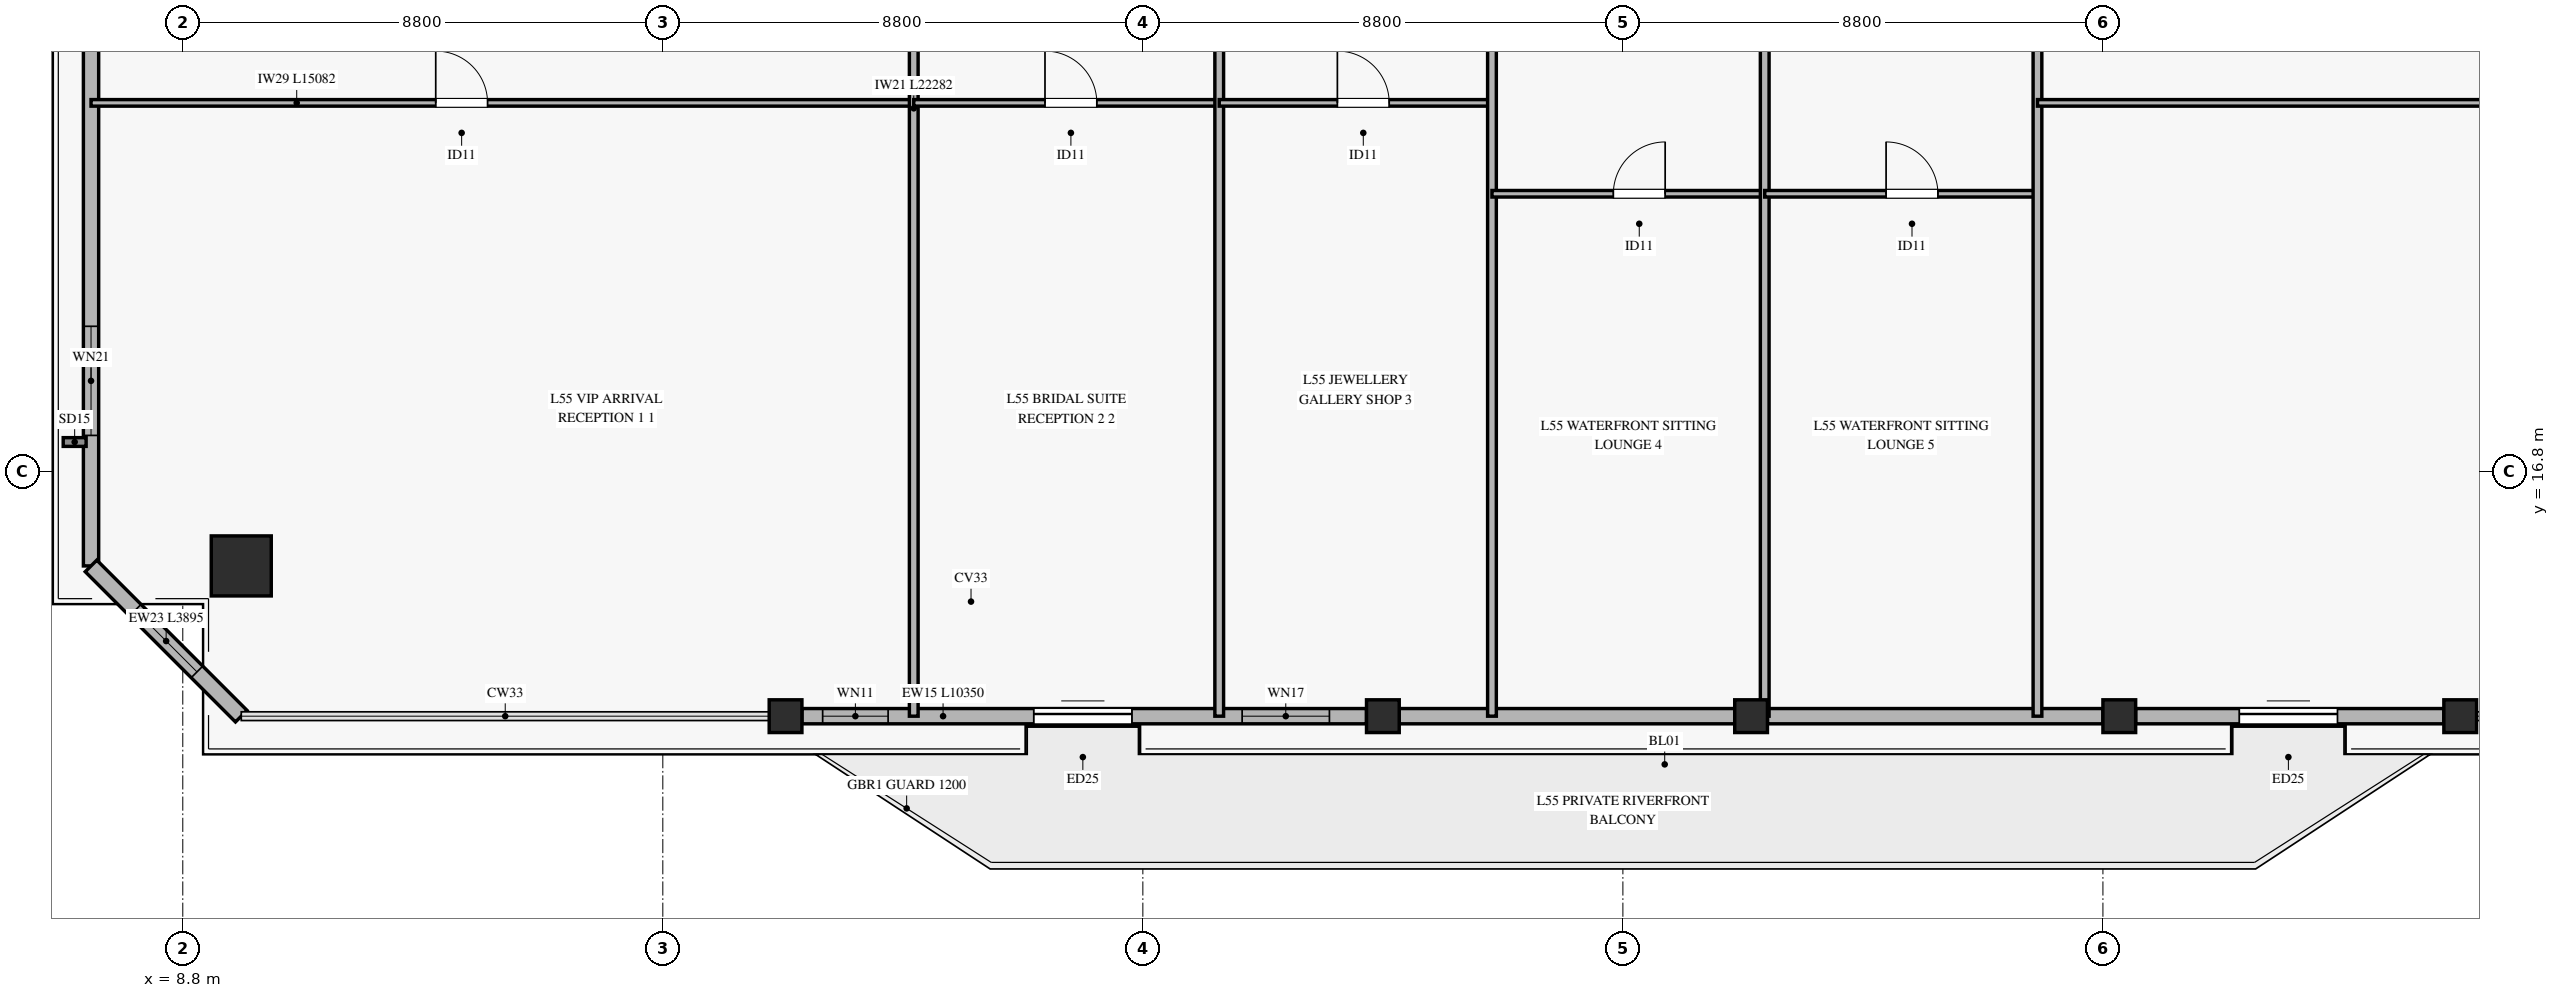
"""IFC4 building model, lengths in metres.
Left out: names, types, materials, properties, quantities, classifications, styles, units other than length and angle.
Written with IfcOpenShell. Run it as: python <this file> out.ifc"""

import sys

from ifc_helpers import new_model, si_unit, direction, frame, frame_2d, origin, origin_2d, place, context, subcontext, project, spatial, rectangle, hollow_rectangle, extrude, source, transform, mapped, element, fill, save


model = new_model("IFC4")
c1 = context("Model", 3, precision=1e-05, world=origin(), true_north=direction((0.0, 1.0)))
c2 = subcontext(c1, "Body", "Model", "MODEL_VIEW")
j1 = project(units=[si_unit("LENGTHUNIT", "METRE"), si_unit("PLANEANGLEUNIT", "RADIAN")], contexts=[c1])
p1 = place(None, origin())
s1 = spatial("IfcSite", under=j1, at=p1, CompositionType="ELEMENT")
p2 = place(p1, origin())
s2 = spatial("IfcBuilding", under=s1, at=p2, CompositionType="ELEMENT")
p3 = place(p2, frame((0.0, 0.0, 216.7)))
s3 = spatial("IfcBuildingStorey", under=s2, at=p3, CompositionType="ELEMENT", Elevation=216.7)
m1 = source(origin(), c2, "Body", "SweptSolid", [
    extrude(hollow_rectangle(XDim=1.1, YDim=1.1, WallThickness=0.05, at=origin_2d()), origin(), (0.0, 0.0, 1.0), 3.24),
])
p4 = place(p3, frame((9.872, 15.072, 0.0), z_axis=(0.0, 0.0, 1.0), x_axis=(1.0, 0.0, 0.0)))
e1 = element("IfcColumn", 1, at=p4, inside=s3, PredefinedType="COLUMN", context=c2, shape_type="MappedRepresentation", body=[
    mapped(m1, transform((0.0, 0.0, 0.0), x_axis=(1.0, 0.0, 0.0), y_axis=(0.0, 1.0, 0.0), z_axis=(0.0, 0.0, 1.0), scale=1.0)),
])
m2 = source(origin(), c2, "Body", "SweptSolid", [
    extrude(hollow_rectangle(XDim=0.6, YDim=0.6, WallThickness=0.028, at=origin_2d()), origin(), (0.0, 0.0, 1.0), 3.24),
])
for number, where, z_axis, x_axis in (
    (2, (19.85, 12.318, 0.0), (0.0, 0.0, 1.0), (1.0, 0.0, 0.0)),
    (3, (30.8, 12.318, 0.0), (0.0, 0.0, 1.0), (1.0, 0.0, 0.0)),
    (4, (37.55, 12.318, 0.0), (0.0, 0.0, 1.0), (1.0, 0.0, 0.0)),
    (5, (44.3, 12.318, 0.0), (0.0, 0.0, 1.0), (1.0, 0.0, 0.0)),
    (6, (50.55, 12.318, 0.0), (0.0, 0.0, 1.0), (1.0, 0.0, 0.0)),
):
    element("IfcColumn", number, at=place(p3, frame(where, z_axis=z_axis, x_axis=x_axis)), inside=s3, PredefinedType="COLUMN", context=c2, shape_type="MappedRepresentation", body=[
        mapped(m2, transform((0.0, 0.0, 0.0), x_axis=(1.0, 0.0, 0.0), y_axis=(0.0, 1.0, 0.0), z_axis=(0.0, 0.0, 1.0), scale=1.0)),
    ])
p5 = place(p3, frame((20.15, 12.318, 0.0), z_axis=(0.0, 0.0, 1.0), x_axis=(1.0, 0.0, 0.0)))
e7 = element("IfcWall", 7, at=p5, inside=s3, PredefinedType="SOLIDWALL", context=c2, shape_type="SweptSolid", body=[
    extrude(rectangle(XDim=10.35, YDim=0.28, at=frame_2d((5.175, 0.0))), origin(), (0.0, 0.0, 1.0), 2.72),
])
p6 = place(p5, frame((4.25, 0.0, 0.0)))
e8 = element("IfcOpeningElement", 8, at=p6, cuts=e7, PredefinedType="OPENING", context=c2, shape_type="SweptSolid", body=[
    extrude(rectangle(XDim=1.8, YDim=2.25, at=frame_2d((0.9, 1.125))), frame((0.0, 0.15, 0.0), z_axis=(0.0, -1.0, 0.0), x_axis=(1.0, 0.0, 0.0)), (0.0, 0.0, 1.0), 0.3),
])
p7 = place(p5, frame((0.38, 0.0, 0.35)))
e9 = element("IfcOpeningElement", 9, at=p7, cuts=e7, PredefinedType="OPENING", context=c2, shape_type="SweptSolid", body=[
    extrude(rectangle(XDim=1.2, YDim=2.0, at=frame_2d((0.6, 1.0))), frame((0.0, 0.15, 0.0), z_axis=(0.0, -1.0, 0.0), x_axis=(1.0, 0.0, 0.0)), (0.0, 0.0, 1.0), 0.3),
])
p8 = place(p5, frame((8.07, 0.0, 0.35)))
e10 = element("IfcOpeningElement", 10, at=p8, cuts=e7, PredefinedType="OPENING", context=c2, shape_type="SweptSolid", body=[
    extrude(rectangle(XDim=1.6, YDim=2.0, at=frame_2d((0.8, 1.0))), frame((0.0, 0.15, 0.0), z_axis=(0.0, -1.0, 0.0), x_axis=(1.0, 0.0, 0.0)), (0.0, 0.0, 1.0), 0.3),
])
for number, where, z_axis, x_axis in (
    (11, (31.1, 12.318, 0.0), (0.0, 0.0, 1.0), (1.0, 0.0, 0.0)),
    (12, (37.85, 12.318, 0.0), (0.0, 0.0, 1.0), (1.0, 0.0, 0.0)),
):
    element("IfcWall", number, at=place(p3, frame(where, z_axis=z_axis, x_axis=x_axis)), inside=s3, PredefinedType="SOLIDWALL", context=c2, shape_type="SweptSolid", body=[
        extrude(rectangle(XDim=6.15, YDim=0.28, at=frame_2d((3.075, 0.0))), origin(), (0.0, 0.0, 1.0), 2.72),
    ])
p9 = place(p3, frame((44.6, 12.318, 0.0), z_axis=(0.0, 0.0, 1.0), x_axis=(1.0, 0.0, 0.0)))
e13 = element("IfcWall", 13, at=p9, inside=s3, PredefinedType="SOLIDWALL", context=c2, shape_type="SweptSolid", body=[
    extrude(rectangle(XDim=5.65, YDim=0.28, at=frame_2d((2.825, 0.0))), origin(), (0.0, 0.0, 1.0), 2.72),
])
p10 = place(p9, frame((1.9, 0.0, 0.0)))
e14 = element("IfcOpeningElement", 14, at=p10, cuts=e13, PredefinedType="OPENING", context=c2, shape_type="SweptSolid", body=[
    extrude(rectangle(XDim=1.8, YDim=2.25, at=frame_2d((0.9, 1.125))), frame((0.0, 0.15, 0.0), z_axis=(0.0, -1.0, 0.0), x_axis=(1.0, 0.0, 0.0)), (0.0, 0.0, 1.0), 0.3),
])
p11 = place(p3, frame((7.118, 15.072, 0.0), z_axis=(0.0, 0.0, 1.0), x_axis=(0.0, 1.0, 0.0)))
e15 = element("IfcWall", 15, at=p11, inside=s3, PredefinedType="SOLIDWALL", context=c2, shape_type="SweptSolid", body=[
    extrude(rectangle(XDim=13.837, YDim=0.28, at=frame_2d((6.918, 0.0))), origin(), (0.0, 0.0, 1.0), 2.72),
])
p12 = place(p11, frame((2.392, 0.0, 0.45)))
e16 = element("IfcOpeningElement", 16, at=p12, cuts=e15, PredefinedType="OPENING", context=c2, shape_type="SweptSolid", body=[
    extrude(rectangle(XDim=2.0, YDim=2.0, at=frame_2d((1.0, 1.0))), frame((0.0, 0.15, 0.0), z_axis=(0.0, -1.0, 0.0), x_axis=(1.0, 0.0, 0.0)), (0.0, 0.0, 1.0), 0.3),
])
p13 = place(p3, frame((7.118, 15.072, 0.0), z_axis=(0.0, 0.0, 1.0), x_axis=(0.707138122488, -0.707075438496, 0.0)))
e17 = element("IfcWall", 17, at=p13, inside=s3, PredefinedType="SOLIDWALL", context=c2, shape_type="SweptSolid", body=[
    extrude(rectangle(XDim=3.895, YDim=0.3, at=frame_2d((1.947, 0.0))), origin(), (0.0, 0.0, 1.0), 2.72),
])
p14 = place(p13, frame((1.147, 0.0, 0.45)))
e18 = element("IfcOpeningElement", 18, at=p14, cuts=e17, PredefinedType="OPENING", context=c2, shape_type="SweptSolid", body=[
    extrude(rectangle(XDim=1.6, YDim=2.0, at=frame_2d((0.8, 1.0))), frame((0.0, 0.16, 0.0), z_axis=(0.0, -1.0, 0.0), x_axis=(1.0, 0.0, 0.0)), (0.0, 0.0, 1.0), 0.32),
])
p15 = place(p3, frame((7.118, 23.559, 0.0), z_axis=(0.0, 0.0, 1.0), x_axis=(1.0, 0.0, 0.0)))
e19 = element("IfcWall", 19, at=p15, inside=s3, PredefinedType="PARTITIONING", context=c2, shape_type="SweptSolid", body=[
    extrude(rectangle(XDim=15.082, YDim=0.12, at=frame_2d((7.541, 0.0))), origin(), (0.0, 0.0, 1.0), 2.425),
])
p16 = place(p15, frame((6.319, 0.0, 0.0)))
e20 = element("IfcOpeningElement", 20, at=p16, cuts=e19, PredefinedType="OPENING", context=c2, shape_type="SweptSolid", body=[
    extrude(rectangle(XDim=0.95, YDim=2.1, at=frame_2d((0.475, 1.05))), frame((0.0, 0.07, 0.0), z_axis=(0.0, -1.0, 0.0), x_axis=(1.0, 0.0, 0.0)), (0.0, 0.0, 1.0), 0.14),
])
p17 = place(p3, frame((22.2, 12.318, 0.0), z_axis=(0.0, 0.0, 1.0), x_axis=(0.0, 1.0, 0.0)))
e21 = element("IfcWall", 21, at=p17, inside=s3, PredefinedType="PARTITIONING", context=c2, shape_type="SweptSolid", body=[
    extrude(rectangle(XDim=22.282, YDim=0.16, at=frame_2d((11.141, 0.0))), origin(), (0.0, 0.0, 1.0), 2.725),
])
p18 = place(p3, frame((22.2, 23.559, 0.0), z_axis=(0.0, 0.0, 1.0), x_axis=(1.0, 0.0, 0.0)))
e22 = element("IfcWall", 22, at=p18, inside=s3, PredefinedType="PARTITIONING", context=c2, shape_type="SweptSolid", body=[
    extrude(rectangle(XDim=5.6, YDim=0.12, at=frame_2d((2.8, 0.0))), origin(), (0.0, 0.0, 1.0), 3.24),
])
p19 = place(p18, frame((2.406, 0.0, 0.0)))
e23 = element("IfcOpeningElement", 23, at=p19, cuts=e22, PredefinedType="OPENING", context=c2, shape_type="SweptSolid", body=[
    extrude(rectangle(XDim=0.95, YDim=2.1, at=frame_2d((0.475, 1.05))), frame((0.0, 0.07, 0.0), z_axis=(0.0, -1.0, 0.0), x_axis=(1.0, 0.0, 0.0)), (0.0, 0.0, 1.0), 0.14),
])
p20 = place(p3, frame((27.8, 12.318, 0.0), z_axis=(0.0, 0.0, 1.0), x_axis=(0.0, 1.0, 0.0)))
e24 = element("IfcWall", 24, at=p20, inside=s3, PredefinedType="PARTITIONING", context=c2, shape_type="SweptSolid", body=[
    extrude(rectangle(XDim=22.282, YDim=0.16, at=frame_2d((11.141, 0.0))), origin(), (0.0, 0.0, 1.0), 2.725),
])
p21 = place(p3, frame((27.8, 23.559, 0.0), z_axis=(0.0, 0.0, 1.0), x_axis=(1.0, 0.0, 0.0)))
e25 = element("IfcWall", 25, at=p21, inside=s3, PredefinedType="PARTITIONING", context=c2, shape_type="SweptSolid", body=[
    extrude(rectangle(XDim=5.0, YDim=0.12, at=frame_2d((2.5, 0.0))), origin(), (0.0, 0.0, 1.0), 2.425),
])
p22 = place(p21, frame((2.166, 0.0, 0.0)))
e26 = element("IfcOpeningElement", 26, at=p22, cuts=e25, PredefinedType="OPENING", context=c2, shape_type="SweptSolid", body=[
    extrude(rectangle(XDim=0.95, YDim=2.1, at=frame_2d((0.475, 1.05))), frame((0.0, 0.07, 0.0), z_axis=(0.0, -1.0, 0.0), x_axis=(1.0, 0.0, 0.0)), (0.0, 0.0, 1.0), 0.14),
])
p23 = place(p3, frame((32.8, 12.318, 0.0), z_axis=(0.0, 0.0, 1.0), x_axis=(0.0, 1.0, 0.0)))
e27 = element("IfcWall", 27, at=p23, inside=s3, PredefinedType="PARTITIONING", context=c2, shape_type="SweptSolid", body=[
    extrude(rectangle(XDim=22.282, YDim=0.16, at=frame_2d((11.141, 0.0))), origin(), (0.0, 0.0, 1.0), 2.725),
])
p24 = place(p3, frame((32.8, 21.893, 0.0), z_axis=(0.0, 0.0, 1.0), x_axis=(1.0, 0.0, 0.0)))
e28 = element("IfcWall", 28, at=p24, inside=s3, PredefinedType="PARTITIONING", context=c2, shape_type="SweptSolid", body=[
    extrude(rectangle(XDim=5.0, YDim=0.12, at=frame_2d((2.5, 0.0))), origin(), (0.0, 0.0, 1.0), 2.425),
])
p25 = place(p24, frame((2.225, 0.0, 0.0)))
e29 = element("IfcOpeningElement", 29, at=p25, cuts=e28, PredefinedType="OPENING", context=c2, shape_type="SweptSolid", body=[
    extrude(rectangle(XDim=0.95, YDim=2.1, at=frame_2d((0.475, 1.05))), frame((0.0, 0.07, 0.0), z_axis=(0.0, -1.0, 0.0), x_axis=(1.0, 0.0, 0.0)), (0.0, 0.0, 1.0), 0.14),
])
p26 = place(p3, frame((37.8, 12.318, 0.0), z_axis=(0.0, 0.0, 1.0), x_axis=(0.0, 1.0, 0.0)))
e30 = element("IfcWall", 30, at=p26, inside=s3, PredefinedType="PARTITIONING", context=c2, shape_type="SweptSolid", body=[
    extrude(rectangle(XDim=22.282, YDim=0.16, at=frame_2d((11.141, 0.0))), origin(), (0.0, 0.0, 1.0), 2.425),
])
p27 = place(p3, frame((37.8, 21.893, 0.0), z_axis=(0.0, 0.0, 1.0), x_axis=(1.0, 0.0, 0.0)))
e31 = element("IfcWall", 31, at=p27, inside=s3, PredefinedType="PARTITIONING", context=c2, shape_type="SweptSolid", body=[
    extrude(rectangle(XDim=5.0, YDim=0.12, at=frame_2d((2.5, 0.0))), origin(), (0.0, 0.0, 1.0), 3.24),
])
p28 = place(p27, frame((2.225, 0.0, 0.0)))
e32 = element("IfcOpeningElement", 32, at=p28, cuts=e31, PredefinedType="OPENING", context=c2, shape_type="SweptSolid", body=[
    extrude(rectangle(XDim=0.95, YDim=2.1, at=frame_2d((0.475, 1.05))), frame((0.0, 0.07, 0.0), z_axis=(0.0, -1.0, 0.0), x_axis=(1.0, 0.0, 0.0)), (0.0, 0.0, 1.0), 0.14),
])
p29 = place(p3, frame((42.8, 12.318, 0.0), z_axis=(0.0, 0.0, 1.0), x_axis=(0.0, 1.0, 0.0)))
e33 = element("IfcWall", 33, at=p29, inside=s3, PredefinedType="PARTITIONING", context=c2, shape_type="SweptSolid", body=[
    extrude(rectangle(XDim=22.282, YDim=0.16, at=frame_2d((11.141, 0.0))), origin(), (0.0, 0.0, 1.0), 2.725),
])
p30 = place(p3, frame((42.8, 23.559, 0.0), z_axis=(0.0, 0.0, 1.0), x_axis=(1.0, 0.0, 0.0)))
e34 = element("IfcWall", 34, at=p30, inside=s3, PredefinedType="PARTITIONING", context=c2, shape_type="SweptSolid", body=[
    extrude(rectangle(XDim=20.482, YDim=0.12, at=frame_2d((10.241, 0.0))), origin(), (0.0, 0.0, 1.0), 2.425),
])
p31 = place(p30, frame((8.279, 0.0, 0.0)))
e35 = element("IfcOpeningElement", 35, at=p31, cuts=e34, PredefinedType="OPENING", context=c2, shape_type="SweptSolid", body=[
    extrude(rectangle(XDim=0.95, YDim=2.1, at=frame_2d((0.475, 1.05))), frame((0.0, 0.07, 0.0), z_axis=(0.0, -1.0, 0.0), x_axis=(1.0, 0.0, 0.0)), (0.0, 0.0, 1.0), 0.14),
])
m3 = source(origin(), c2, "Body", "SweptSolid", [
    extrude(rectangle(XDim=1.8, YDim=2.25, at=frame_2d((0.9, 1.125))), frame((0.0, 0.025, 0.0), z_axis=(0.0, -1.0, 0.0), x_axis=(1.0, 0.0, 0.0)), (0.0, 0.0, 1.0), 0.05),
])
p32 = place(p6, origin())
e36 = element("IfcDoor", 36, at=p32, inside=s3, OperationType="SLIDING_TO_LEFT", PredefinedType="DOOR", context=c2, shape_type="MappedRepresentation", body=[
    mapped(m3, transform((0.0, 0.0, 0.0), x_axis=(1.0, 0.0, 0.0), y_axis=(0.0, 1.0, 0.0), z_axis=(0.0, 0.0, 1.0), scale=1.0)),
])
fill(e8, e36)
m4 = source(origin(), c2, "Body", "SweptSolid", [
    extrude(rectangle(XDim=1.2, YDim=2.0, at=frame_2d((0.6, 1.0))), frame((0.0, 0.03, 0.0), z_axis=(0.0, -1.0, 0.0), x_axis=(1.0, 0.0, 0.0)), (0.0, 0.0, 1.0), 0.06),
])
p33 = place(p7, origin())
e37 = element("IfcWindow", 37, at=p33, inside=s3, PartitioningType="SINGLE_PANEL", PredefinedType="WINDOW", context=c2, shape_type="MappedRepresentation", body=[
    mapped(m4, transform((0.0, 0.0, 0.0), x_axis=(1.0, 0.0, 0.0), y_axis=(0.0, 1.0, 0.0), z_axis=(0.0, 0.0, 1.0), scale=1.0)),
])
fill(e9, e37)
m5 = source(origin(), c2, "Body", "SweptSolid", [
    extrude(rectangle(XDim=1.6, YDim=2.0, at=frame_2d((0.8, 1.0))), frame((0.0, 0.03, 0.0), z_axis=(0.0, -1.0, 0.0), x_axis=(1.0, 0.0, 0.0)), (0.0, 0.0, 1.0), 0.06),
])
p34 = place(p8, origin())
e38 = element("IfcWindow", 38, at=p34, inside=s3, PartitioningType="SINGLE_PANEL", PredefinedType="WINDOW", context=c2, shape_type="MappedRepresentation", body=[
    mapped(m5, transform((0.0, 0.0, 0.0), x_axis=(1.0, 0.0, 0.0), y_axis=(0.0, 1.0, 0.0), z_axis=(0.0, 0.0, 1.0), scale=1.0)),
])
fill(e10, e38)
p35 = place(p10, origin())
e39 = element("IfcDoor", 39, at=p35, inside=s3, OperationType="SLIDING_TO_LEFT", PredefinedType="DOOR", context=c2, shape_type="MappedRepresentation", body=[
    mapped(m3, transform((0.0, 0.0, 0.0), x_axis=(1.0, 0.0, 0.0), y_axis=(0.0, 1.0, 0.0), z_axis=(0.0, 0.0, 1.0), scale=1.0)),
])
fill(e14, e39)
m6 = source(origin(), c2, "Body", "SweptSolid", [
    extrude(rectangle(XDim=2.0, YDim=2.0, at=frame_2d((1.0, 1.0))), frame((0.0, 0.03, 0.0), z_axis=(0.0, -1.0, 0.0), x_axis=(1.0, 0.0, 0.0)), (0.0, 0.0, 1.0), 0.06),
])
p36 = place(p12, origin())
e40 = element("IfcWindow", 40, at=p36, inside=s3, PartitioningType="SINGLE_PANEL", PredefinedType="WINDOW", context=c2, shape_type="MappedRepresentation", body=[
    mapped(m6, transform((0.0, 0.0, 0.0), x_axis=(1.0, 0.0, 0.0), y_axis=(0.0, 1.0, 0.0), z_axis=(0.0, 0.0, 1.0), scale=1.0)),
])
fill(e16, e40)
p37 = place(p14, origin())
e41 = element("IfcWindow", 41, at=p37, inside=s3, PartitioningType="SINGLE_PANEL", PredefinedType="WINDOW", context=c2, shape_type="MappedRepresentation", body=[
    mapped(m5, transform((0.0, 0.0, 0.0), x_axis=(1.0, 0.0, 0.0), y_axis=(0.0, 1.0, 0.0), z_axis=(0.0, 0.0, 1.0), scale=1.0)),
])
fill(e18, e41)
m7 = source(origin(), c2, "Body", "SweptSolid", [
    extrude(rectangle(XDim=0.95, YDim=2.1, at=frame_2d((0.475, 1.05))), frame((0.0, 0.025, 0.0), z_axis=(0.0, -1.0, 0.0), x_axis=(1.0, 0.0, 0.0)), (0.0, 0.0, 1.0), 0.05),
])
p38 = place(p16, origin())
e42 = element("IfcDoor", 42, at=p38, inside=s3, OperationType="SINGLE_SWING_LEFT", PredefinedType="DOOR", context=c2, shape_type="MappedRepresentation", body=[
    mapped(m7, transform((0.0, 0.0, 0.0), x_axis=(1.0, 0.0, 0.0), y_axis=(0.0, 1.0, 0.0), z_axis=(0.0, 0.0, 1.0), scale=1.0)),
])
fill(e20, e42)
p39 = place(p19, origin())
e43 = element("IfcDoor", 43, at=p39, inside=s3, OperationType="SINGLE_SWING_LEFT", PredefinedType="DOOR", context=c2, shape_type="MappedRepresentation", body=[
    mapped(m7, transform((0.0, 0.0, 0.0), x_axis=(1.0, 0.0, 0.0), y_axis=(0.0, 1.0, 0.0), z_axis=(0.0, 0.0, 1.0), scale=1.0)),
])
fill(e23, e43)
p40 = place(p22, origin())
e44 = element("IfcDoor", 44, at=p40, inside=s3, OperationType="SINGLE_SWING_LEFT", PredefinedType="DOOR", context=c2, shape_type="MappedRepresentation", body=[
    mapped(m7, transform((0.0, 0.0, 0.0), x_axis=(1.0, 0.0, 0.0), y_axis=(0.0, 1.0, 0.0), z_axis=(0.0, 0.0, 1.0), scale=1.0)),
])
fill(e26, e44)
p41 = place(p25, origin())
e45 = element("IfcDoor", 45, at=p41, inside=s3, OperationType="SINGLE_SWING_RIGHT", PredefinedType="DOOR", context=c2, shape_type="MappedRepresentation", body=[
    mapped(m7, transform((0.0, 0.0, 0.0), x_axis=(1.0, 0.0, 0.0), y_axis=(0.0, 1.0, 0.0), z_axis=(0.0, 0.0, 1.0), scale=1.0)),
])
fill(e29, e45)
p42 = place(p28, origin())
e46 = element("IfcDoor", 46, at=p42, inside=s3, OperationType="SINGLE_SWING_LEFT", PredefinedType="DOOR", context=c2, shape_type="MappedRepresentation", body=[
    mapped(m7, transform((0.0, 0.0, 0.0), x_axis=(1.0, 0.0, 0.0), y_axis=(0.0, 1.0, 0.0), z_axis=(0.0, 0.0, 1.0), scale=1.0)),
])
fill(e32, e46)
save(model, sys.argv[1])
